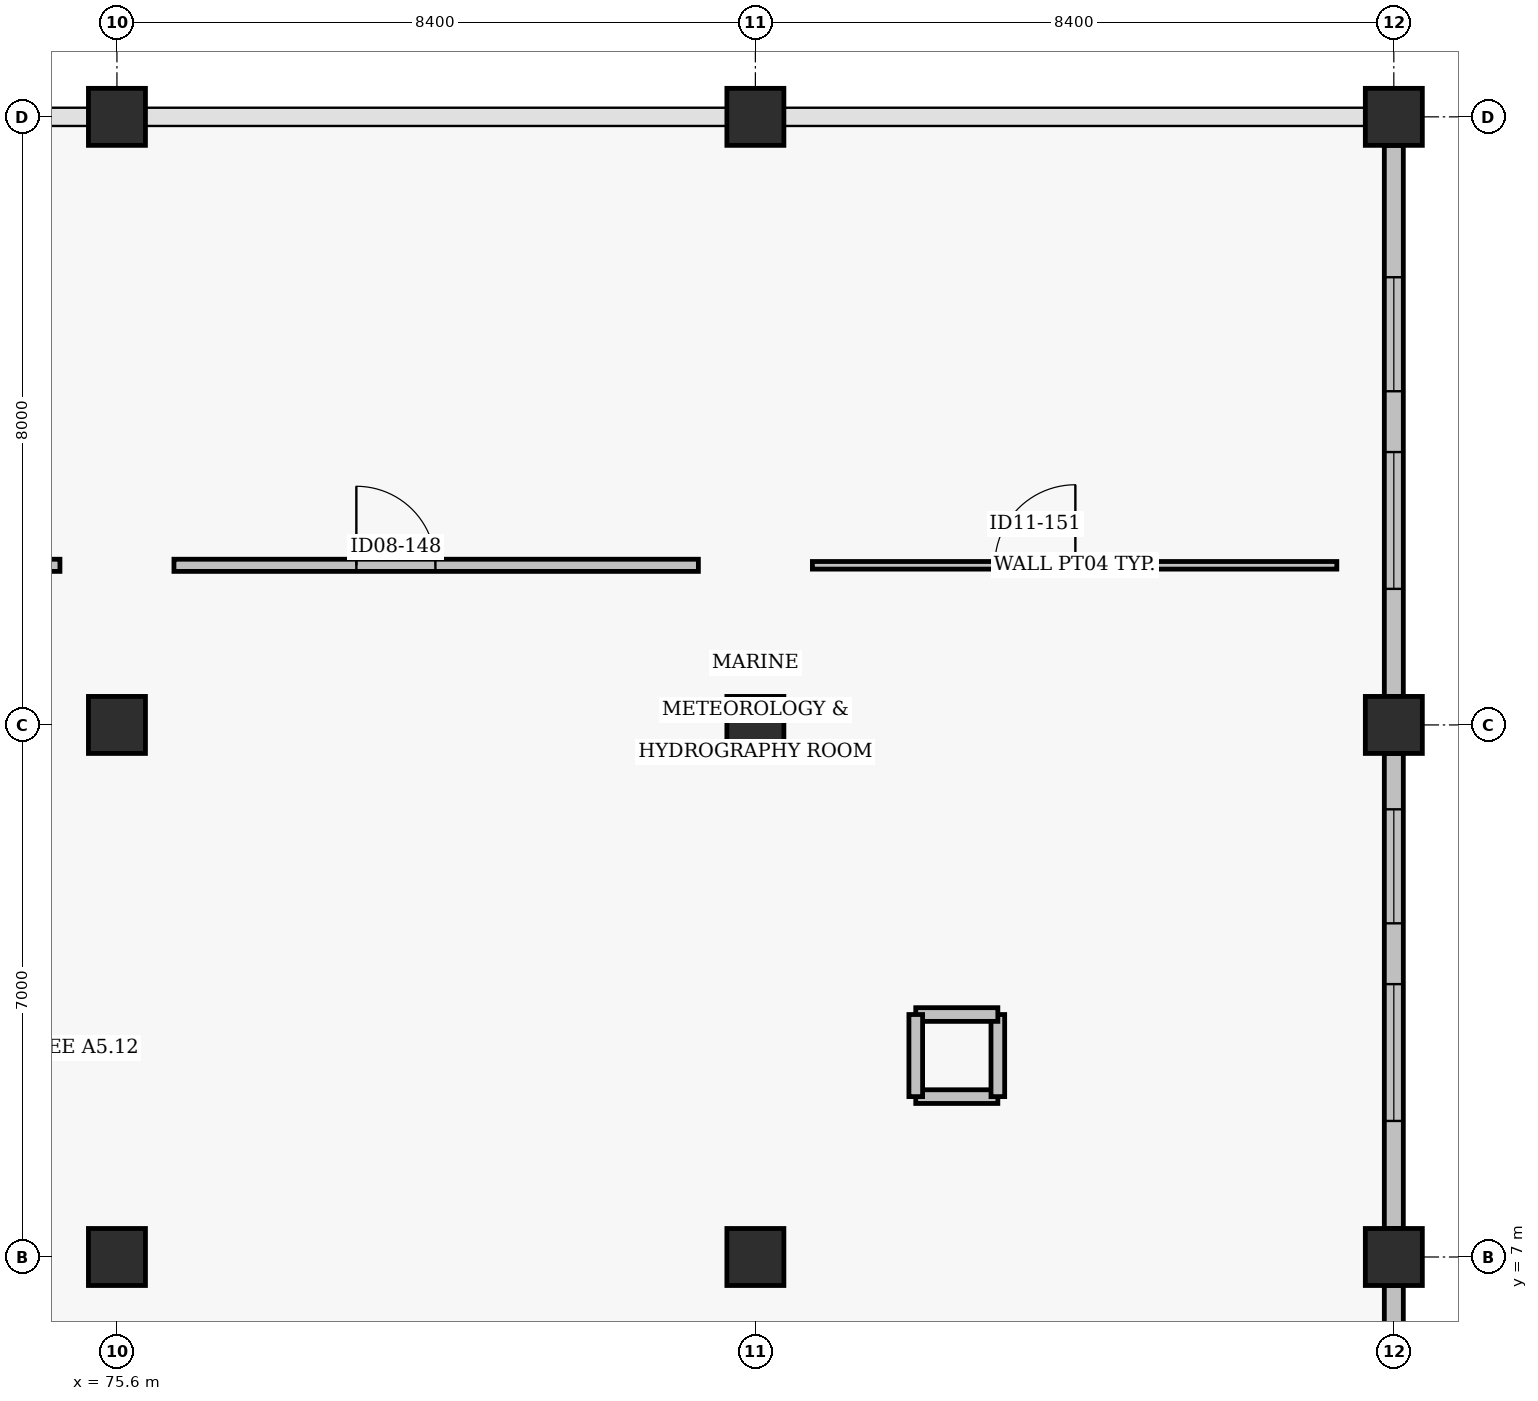
"""IFC4 building model, lengths in metres.
Left out: names, types, materials, properties, quantities, classifications, styles, units other than length and angle.
Written with IfcOpenShell. Run it as: python <this file> out.ifc"""

import sys

from ifc_helpers import new_model, si_unit, direction, frame, frame_2d, origin, origin_2d, place, context, subcontext, project, spatial, rectangle, extrude, element, fill, save


model = new_model("IFC4")
c1 = context("Model", 3, precision=1e-05, world=origin(), true_north=direction((0.0, 1.0)))
c2 = subcontext(c1, "Body", "Model", "MODEL_VIEW")
j1 = project(units=[si_unit("LENGTHUNIT", "METRE"), si_unit("PLANEANGLEUNIT", "RADIAN")], contexts=[c1])
p1 = place(None, origin())
s1 = spatial("IfcSite", under=j1, at=p1, CompositionType="ELEMENT")
p2 = place(p1, origin())
s2 = spatial("IfcBuilding", under=s1, at=p2, CompositionType="ELEMENT")
p3 = place(p2, frame((0.0, 0.0, 9.6)))
s3 = spatial("IfcBuildingStorey", under=s2, at=p3, CompositionType="ELEMENT", Elevation=9.6)
for number, where, z_axis, x_axis in (
    (1, (75.6, 7.0, 0.0), (0.0, 0.0, 1.0), (1.0, 0.0, 0.0)),
    (2, (75.6, 14.0, 0.0), (0.0, 0.0, 1.0), (1.0, 0.0, 0.0)),
    (3, (75.6, 22.0, 0.0), (0.0, 0.0, 1.0), (1.0, 0.0, 0.0)),
    (4, (84.0, 7.0, 0.0), (0.0, 0.0, 1.0), (1.0, 0.0, 0.0)),
    (5, (84.0, 14.0, 0.0), (0.0, 0.0, 1.0), (1.0, 0.0, 0.0)),
    (6, (84.0, 22.0, 0.0), (0.0, 0.0, 1.0), (1.0, 0.0, 0.0)),
    (7, (92.4, 7.0, 0.0), (0.0, 0.0, 1.0), (1.0, 0.0, 0.0)),
    (8, (92.4, 14.0, 0.0), (0.0, 0.0, 1.0), (1.0, 0.0, 0.0)),
    (9, (92.4, 22.0, 0.0), (0.0, 0.0, 1.0), (1.0, 0.0, 0.0)),
):
    element("IfcColumn", number, at=place(p3, frame(where, z_axis=z_axis, x_axis=x_axis)), inside=s3, PredefinedType="COLUMN", context=c2, shape_type="SweptSolid", body=[
        extrude(rectangle(XDim=0.75, YDim=0.75, at=origin_2d()), origin(), (0.0, 0.0, 1.0), 3.52),
    ])
p4 = place(p3, frame((92.4, 0.375, 0.0), z_axis=(0.0, 0.0, 1.0), x_axis=(0.0, 1.0, 0.0)))
e10 = element("IfcWall", 10, at=p4, inside=s3, PredefinedType="SOLIDWALL", context=c2, shape_type="SweptSolid", body=[
    extrude(rectangle(XDim=6.25, YDim=0.25, at=frame_2d((3.125, 0.0))), origin(), (0.0, 0.0, 1.0), 2.605),
])
p5 = place(p4, frame((1.415, 0.0, 0.95)))
e11 = element("IfcOpeningElement", 11, at=p5, cuts=e10, PredefinedType="OPENING", context=c2, shape_type="SweptSolid", body=[
    extrude(rectangle(XDim=1.8, YDim=1.5, at=frame_2d((0.9, 0.75))), frame((0.0, 0.135, 0.0), z_axis=(0.0, -1.0, 0.0), x_axis=(1.0, 0.0, 0.0)), (0.0, 0.0, 1.0), 0.27),
])
p6 = place(p4, frame((4.015, 0.0, 0.95)))
e12 = element("IfcOpeningElement", 12, at=p6, cuts=e10, PredefinedType="OPENING", context=c2, shape_type="SweptSolid", body=[
    extrude(rectangle(XDim=1.5, YDim=1.5, at=frame_2d((0.75, 0.75))), frame((0.0, 0.135, 0.0), z_axis=(0.0, -1.0, 0.0), x_axis=(1.0, 0.0, 0.0)), (0.0, 0.0, 1.0), 0.27),
])
p7 = place(p3, frame((92.4, 7.375, 0.0), z_axis=(0.0, 0.0, 1.0), x_axis=(0.0, 1.0, 0.0)))
e13 = element("IfcWall", 13, at=p7, inside=s3, PredefinedType="SOLIDWALL", context=c2, shape_type="SweptSolid", body=[
    extrude(rectangle(XDim=6.25, YDim=0.25, at=frame_2d((3.125, 0.0))), origin(), (0.0, 0.0, 1.0), 2.605),
])
p8 = place(p7, frame((1.415, 0.0, 0.95)))
e14 = element("IfcOpeningElement", 14, at=p8, cuts=e13, PredefinedType="OPENING", context=c2, shape_type="SweptSolid", body=[
    extrude(rectangle(XDim=1.8, YDim=1.5, at=frame_2d((0.9, 0.75))), frame((0.0, 0.135, 0.0), z_axis=(0.0, -1.0, 0.0), x_axis=(1.0, 0.0, 0.0)), (0.0, 0.0, 1.0), 0.27),
])
p9 = place(p7, frame((4.015, 0.0, 0.95)))
e15 = element("IfcOpeningElement", 15, at=p9, cuts=e13, PredefinedType="OPENING", context=c2, shape_type="SweptSolid", body=[
    extrude(rectangle(XDim=1.5, YDim=1.5, at=frame_2d((0.75, 0.75))), frame((0.0, 0.135, 0.0), z_axis=(0.0, -1.0, 0.0), x_axis=(1.0, 0.0, 0.0)), (0.0, 0.0, 1.0), 0.27),
])
p10 = place(p3, frame((92.4, 14.375, 0.0), z_axis=(0.0, 0.0, 1.0), x_axis=(0.0, 1.0, 0.0)))
e16 = element("IfcWall", 16, at=p10, inside=s3, PredefinedType="SOLIDWALL", context=c2, shape_type="SweptSolid", body=[
    extrude(rectangle(XDim=7.25, YDim=0.25, at=frame_2d((3.625, 0.0))), origin(), (0.0, 0.0, 1.0), 2.605),
])
p11 = place(p10, frame((1.415, 0.0, 0.95)))
e17 = element("IfcOpeningElement", 17, at=p11, cuts=e16, PredefinedType="OPENING", context=c2, shape_type="SweptSolid", body=[
    extrude(rectangle(XDim=1.8, YDim=1.5, at=frame_2d((0.9, 0.75))), frame((0.0, 0.135, 0.0), z_axis=(0.0, -1.0, 0.0), x_axis=(1.0, 0.0, 0.0)), (0.0, 0.0, 1.0), 0.27),
])
p12 = place(p10, frame((4.015, 0.0, 0.95)))
e18 = element("IfcOpeningElement", 18, at=p12, cuts=e16, PredefinedType="OPENING", context=c2, shape_type="SweptSolid", body=[
    extrude(rectangle(XDim=1.5, YDim=1.5, at=frame_2d((0.75, 0.75))), frame((0.0, 0.135, 0.0), z_axis=(0.0, -1.0, 0.0), x_axis=(1.0, 0.0, 0.0)), (0.0, 0.0, 1.0), 0.27),
])
for number, where, z_axis, x_axis in (
    (19, (86.11, 9.11, 0.0), (0.0, 0.0, 1.0), (1.0, 0.0, 0.0)),
    (20, (87.19, 9.11, 0.0), (0.0, 0.0, 1.0), (0.0, 1.0, 0.0)),
    (21, (87.19, 10.19, 0.0), (0.0, 0.0, 1.0), (-1.0, 0.0, 0.0)),
    (22, (86.11, 10.19, 0.0), (0.0, 0.0, 1.0), (0.0, -1.0, 0.0)),
):
    element("IfcWall", number, at=place(p3, frame(where, z_axis=z_axis, x_axis=x_axis)), inside=s3, PredefinedType="SOLIDWALL", context=c2, shape_type="SweptSolid", body=[
        extrude(rectangle(XDim=1.08, YDim=0.18, at=frame_2d((0.54, 0.0))), origin(), (0.0, 0.0, 1.0), 2.6),
    ])
p13 = place(p3, frame((67.95, 16.1, 0.0), z_axis=(0.0, 0.0, 1.0), x_axis=(1.0, 0.0, 0.0)))
e23 = element("IfcWall", 23, at=p13, inside=s3, PredefinedType="PARTITIONING", context=c2, shape_type="SweptSolid", body=[
    extrude(rectangle(XDim=6.9, YDim=0.16, at=frame_2d((3.45, 0.0))), origin(), (0.0, 0.0, 1.0), 2.5),
])
p14 = place(p13, frame((2.4, 0.0, 0.0)))
e24 = element("IfcOpeningElement", 24, at=p14, cuts=e23, PredefinedType="OPENING", context=c2, shape_type="SweptSolid", body=[
    extrude(rectangle(XDim=1.04, YDim=2.14, at=frame_2d((0.52, 1.07))), frame((0.0, 0.09, 0.0), z_axis=(0.0, -1.0, 0.0), x_axis=(1.0, 0.0, 0.0)), (0.0, 0.0, 1.0), 0.18),
])
p15 = place(p3, frame((76.35, 16.1, 0.0), z_axis=(0.0, 0.0, 1.0), x_axis=(1.0, 0.0, 0.0)))
e25 = element("IfcWall", 25, at=p15, inside=s3, PredefinedType="PARTITIONING", context=c2, shape_type="SweptSolid", body=[
    extrude(rectangle(XDim=6.9, YDim=0.16, at=frame_2d((3.45, 0.0))), origin(), (0.0, 0.0, 1.0), 2.5),
])
p16 = place(p15, frame((2.4, 0.0, 0.0)))
e26 = element("IfcOpeningElement", 26, at=p16, cuts=e25, PredefinedType="OPENING", context=c2, shape_type="SweptSolid", body=[
    extrude(rectangle(XDim=1.04, YDim=2.14, at=frame_2d((0.52, 1.07))), frame((0.0, 0.09, 0.0), z_axis=(0.0, -1.0, 0.0), x_axis=(1.0, 0.0, 0.0)), (0.0, 0.0, 1.0), 0.18),
])
p17 = place(p3, frame((84.75, 16.1, 0.0), z_axis=(0.0, 0.0, 1.0), x_axis=(1.0, 0.0, 0.0)))
e27 = element("IfcWall", 27, at=p17, inside=s3, PredefinedType="PARTITIONING", context=c2, shape_type="SweptSolid", body=[
    extrude(rectangle(XDim=6.9, YDim=0.1, at=frame_2d((3.45, 0.0))), origin(), (0.0, 0.0, 1.0), 2.5),
])
p18 = place(p17, frame((2.4, 0.0, 0.0)))
e28 = element("IfcOpeningElement", 28, at=p18, cuts=e27, PredefinedType="OPENING", context=c2, shape_type="SweptSolid", body=[
    extrude(rectangle(XDim=1.06, YDim=2.1, at=frame_2d((0.53, 1.05))), frame((0.0, 0.06, 0.0), z_axis=(0.0, -1.0, 0.0), x_axis=(1.0, 0.0, 0.0)), (0.0, 0.0, 1.0), 0.12),
])
p19 = place(p8, origin())
e29 = element("IfcWindow", 29, at=p19, inside=s3, PartitioningType="DOUBLE_PANEL_VERTICAL", PredefinedType="WINDOW", context=c2, shape_type="SweptSolid", body=[
    extrude(rectangle(XDim=1.8, YDim=1.5, at=frame_2d((0.9, 0.75))), frame((0.0, 0.03, 0.0), z_axis=(0.0, -1.0, 0.0), x_axis=(1.0, 0.0, 0.0)), (0.0, 0.0, 1.0), 0.06),
])
fill(e14, e29)
p20 = place(p9, origin())
e30 = element("IfcWindow", 30, at=p20, inside=s3, PartitioningType="SINGLE_PANEL", PredefinedType="WINDOW", context=c2, shape_type="SweptSolid", body=[
    extrude(rectangle(XDim=1.5, YDim=1.5, at=frame_2d((0.75, 0.75))), frame((0.0, 0.03, 0.0), z_axis=(0.0, -1.0, 0.0), x_axis=(1.0, 0.0, 0.0)), (0.0, 0.0, 1.0), 0.06),
])
fill(e15, e30)
p21 = place(p11, origin())
e31 = element("IfcWindow", 31, at=p21, inside=s3, PartitioningType="DOUBLE_PANEL_VERTICAL", PredefinedType="WINDOW", context=c2, shape_type="SweptSolid", body=[
    extrude(rectangle(XDim=1.8, YDim=1.5, at=frame_2d((0.9, 0.75))), frame((0.0, 0.03, 0.0), z_axis=(0.0, -1.0, 0.0), x_axis=(1.0, 0.0, 0.0)), (0.0, 0.0, 1.0), 0.06),
])
fill(e17, e31)
p22 = place(p12, origin())
e32 = element("IfcWindow", 32, at=p22, inside=s3, PartitioningType="SINGLE_PANEL", PredefinedType="WINDOW", context=c2, shape_type="SweptSolid", body=[
    extrude(rectangle(XDim=1.5, YDim=1.5, at=frame_2d((0.75, 0.75))), frame((0.0, 0.03, 0.0), z_axis=(0.0, -1.0, 0.0), x_axis=(1.0, 0.0, 0.0)), (0.0, 0.0, 1.0), 0.06),
])
fill(e18, e32)
p23 = place(p16, origin())
e33 = element("IfcDoor", 33, at=p23, inside=s3, OperationType="SINGLE_SWING_LEFT", PredefinedType="DOOR", context=c2, shape_type="SweptSolid", body=[
    extrude(rectangle(XDim=1.04, YDim=2.14, at=frame_2d((0.52, 1.07))), frame((0.0, 0.025, 0.0), z_axis=(0.0, -1.0, 0.0), x_axis=(1.0, 0.0, 0.0)), (0.0, 0.0, 1.0), 0.05),
])
fill(e26, e33)
p24 = place(p18, origin())
e34 = element("IfcDoor", 34, at=p24, inside=s3, OperationType="SINGLE_SWING_RIGHT", PredefinedType="DOOR", context=c2, shape_type="SweptSolid", body=[
    extrude(rectangle(XDim=1.06, YDim=2.1, at=frame_2d((0.53, 1.05))), frame((0.0, 0.025, 0.0), z_axis=(0.0, -1.0, 0.0), x_axis=(1.0, 0.0, 0.0)), (0.0, 0.0, 1.0), 0.05),
])
fill(e28, e34)
save(model, sys.argv[1])
